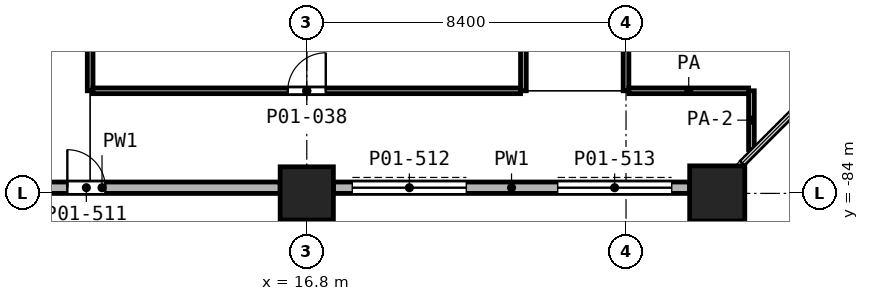
"""IFC4 building model, lengths in metres.
Left out: names, types, materials, properties, quantities, classifications, styles, units other than length and angle.
Written with IfcOpenShell. Run it as: python <this file> out.ifc"""

import sys

from ifc_helpers import new_model, si_unit, direction, frame, frame_2d, origin, origin_2d, place, context, subcontext, project, spatial, rectangle, extrude, element, fill, save


model = new_model("IFC4")
c1 = context("Model", 3, precision=1e-05, world=origin(), true_north=direction((0.0, 1.0)))
c2 = subcontext(c1, "Body", "Model", "MODEL_VIEW")
j1 = project(units=[si_unit("LENGTHUNIT", "METRE"), si_unit("PLANEANGLEUNIT", "RADIAN")], contexts=[c1])
p1 = place(None, origin())
s1 = spatial("IfcSite", under=j1, at=p1, CompositionType="ELEMENT")
p2 = place(p1, origin())
s2 = spatial("IfcBuilding", under=s1, at=p2, CompositionType="ELEMENT")
p3 = place(p2, origin())
s3 = spatial("IfcBuildingStorey", under=s2, at=p3, CompositionType="ELEMENT", Elevation=0.0)
p4 = place(p3, frame((16.8, -84.0, 0.0), z_axis=(0.0, 0.0, 1.0), x_axis=(1.0, 0.0, 0.0)))
e1 = element("IfcColumn", 1, at=p4, inside=s3, PredefinedType="COLUMN", context=c2, shape_type="SweptSolid", body=[
    extrude(rectangle(XDim=1.4, YDim=1.4, at=origin_2d()), origin(), (0.0, 0.0, 1.0), 7.0),
])
p5 = place(p3, frame((27.6, -84.0, 0.0), z_axis=(0.0, 0.0, 1.0), x_axis=(1.0, 0.0, 0.0)))
e2 = element("IfcColumn", 2, at=p5, inside=s3, PredefinedType="COLUMN", context=c2, shape_type="SweptSolid", body=[
    extrude(rectangle(XDim=1.45, YDim=1.45, at=origin_2d()), origin(), (0.0, 0.0, 1.0), 7.0),
])
p6 = place(p3, frame((6.725, -83.85, 0.0), z_axis=(0.0, 0.0, 1.0), x_axis=(1.0, 0.0, 0.0)))
e3 = element("IfcWall", 3, at=p6, inside=s3, PredefinedType="SOLIDWALL", context=c2, shape_type="SweptSolid", body=[
    extrude(rectangle(XDim=9.375, YDim=0.3, at=frame_2d((4.688, 0.0))), origin(), (0.0, 0.0, 1.0), 5.25),
])
p7 = place(p6, frame((3.775, 0.0, 0.0)))
e4 = element("IfcOpeningElement", 4, at=p7, cuts=e3, PredefinedType="OPENING", context=c2, shape_type="SweptSolid", body=[
    extrude(rectangle(XDim=1.0, YDim=2.1, at=frame_2d((0.5, 1.05))), frame((0.0, 0.16, 0.0), z_axis=(0.0, -1.0, 0.0), x_axis=(1.0, 0.0, 0.0)), (0.0, 0.0, 1.0), 0.32),
])
p8 = place(p3, frame((17.5, -83.85, 0.0), z_axis=(0.0, 0.0, 1.0), x_axis=(1.0, 0.0, 0.0)))
e5 = element("IfcWall", 5, at=p8, inside=s3, PredefinedType="SOLIDWALL", context=c2, shape_type="SweptSolid", body=[
    extrude(rectangle(XDim=9.375, YDim=0.3, at=frame_2d((4.688, 0.0))), origin(), (0.0, 0.0, 1.0), 5.25),
])
p9 = place(p8, frame((0.5, 0.0, 0.0)))
e6 = element("IfcOpeningElement", 6, at=p9, cuts=e5, PredefinedType="OPENING", context=c2, shape_type="SweptSolid", body=[
    extrude(rectangle(XDim=3.0, YDim=3.5, at=frame_2d((1.5, 1.75))), frame((0.0, 0.16, 0.0), z_axis=(0.0, -1.0, 0.0), x_axis=(1.0, 0.0, 0.0)), (0.0, 0.0, 1.0), 0.32),
])
p10 = place(p8, frame((5.9, 0.0, 0.0)))
e7 = element("IfcOpeningElement", 7, at=p10, cuts=e5, PredefinedType="OPENING", context=c2, shape_type="SweptSolid", body=[
    extrude(rectangle(XDim=3.0, YDim=3.5, at=frame_2d((1.5, 1.75))), frame((0.0, 0.16, 0.0), z_axis=(0.0, -1.0, 0.0), x_axis=(1.0, 0.0, 0.0)), (0.0, 0.0, 1.0), 0.32),
])
p11 = place(p3, frame((11.175, -81.3, 0.0), z_axis=(0.0, 0.0, 1.0), x_axis=(1.0, 0.0, 0.0)))
e8 = element("IfcWall", 8, at=p11, inside=s3, PredefinedType="PARTITIONING", context=c2, shape_type="SweptSolid", body=[
    extrude(rectangle(XDim=11.25, YDim=0.15, at=frame_2d((5.625, 0.0))), origin(), (0.0, 0.0, 1.0), 6.65),
])
p12 = place(p11, frame((5.125, 0.0, 0.0)))
e9 = element("IfcOpeningElement", 9, at=p12, cuts=e8, PredefinedType="OPENING", context=c2, shape_type="SweptSolid", body=[
    extrude(rectangle(XDim=1.0, YDim=2.1, at=frame_2d((0.5, 1.05))), frame((0.0, 0.085, 0.0), z_axis=(0.0, -1.0, 0.0), x_axis=(1.0, 0.0, 0.0)), (0.0, 0.0, 1.0), 0.17),
])
p13 = place(p3, frame((25.275, -81.3, 0.0), z_axis=(0.0, 0.0, 1.0), x_axis=(1.0, 0.0, 0.0)))
e10 = element("IfcWall", 10, at=p13, inside=s3, PredefinedType="PARTITIONING", context=c2, shape_type="SweptSolid", body=[
    extrude(rectangle(XDim=3.15, YDim=0.15, at=frame_2d((1.575, 0.0))), origin(), (0.0, 0.0, 1.0), 6.65),
])
p14 = place(p3, frame((11.1, -81.3, 0.0), z_axis=(0.0, 0.0, 1.0), x_axis=(0.0, 1.0, 0.0)))
e11 = element("IfcWall", 11, at=p14, inside=s3, PredefinedType="PARTITIONING", context=c2, shape_type="SweptSolid", body=[
    extrude(rectangle(XDim=51.9, YDim=0.15, at=frame_2d((25.95, 0.0))), origin(), (0.0, 0.0, 1.0), 6.65),
])
p15 = place(p14, frame((49.0, 0.0, 0.0)))
e12 = element("IfcOpeningElement", 12, at=p15, cuts=e11, PredefinedType="OPENING", context=c2, shape_type="SweptSolid", body=[
    extrude(rectangle(XDim=1.0, YDim=2.1, at=frame_2d((0.5, 1.05))), frame((0.0, 0.085, 0.0), z_axis=(0.0, -1.0, 0.0), x_axis=(1.0, 0.0, 0.0)), (0.0, 0.0, 1.0), 0.17),
])
p16 = place(p14, frame((41.05, 0.0, 0.0)))
e13 = element("IfcOpeningElement", 13, at=p16, cuts=e11, PredefinedType="OPENING", context=c2, shape_type="SweptSolid", body=[
    extrude(rectangle(XDim=1.0, YDim=2.1, at=frame_2d((0.5, 1.05))), frame((0.0, 0.085, 0.0), z_axis=(0.0, -1.0, 0.0), x_axis=(1.0, 0.0, 0.0)), (0.0, 0.0, 1.0), 0.17),
])
p17 = place(p14, frame((36.55, 0.0, 0.0)))
e14 = element("IfcOpeningElement", 14, at=p17, cuts=e11, PredefinedType="OPENING", context=c2, shape_type="SweptSolid", body=[
    extrude(rectangle(XDim=1.0, YDim=2.1, at=frame_2d((0.5, 1.05))), frame((0.0, 0.085, 0.0), z_axis=(0.0, -1.0, 0.0), x_axis=(1.0, 0.0, 0.0)), (0.0, 0.0, 1.0), 0.17),
])
p18 = place(p14, frame((28.6, 0.0, 0.0)))
e15 = element("IfcOpeningElement", 15, at=p18, cuts=e11, PredefinedType="OPENING", context=c2, shape_type="SweptSolid", body=[
    extrude(rectangle(XDim=1.0, YDim=2.1, at=frame_2d((0.5, 1.05))), frame((0.0, 0.085, 0.0), z_axis=(0.0, -1.0, 0.0), x_axis=(1.0, 0.0, 0.0)), (0.0, 0.0, 1.0), 0.17),
])
p19 = place(p14, frame((24.4, 0.0, 0.0)))
e16 = element("IfcOpeningElement", 16, at=p19, cuts=e11, PredefinedType="OPENING", context=c2, shape_type="SweptSolid", body=[
    extrude(rectangle(XDim=1.0, YDim=2.1, at=frame_2d((0.5, 1.05))), frame((0.0, 0.085, 0.0), z_axis=(0.0, -1.0, 0.0), x_axis=(1.0, 0.0, 0.0)), (0.0, 0.0, 1.0), 0.17),
])
p20 = place(p14, frame((15.7, 0.0, 0.0)))
e17 = element("IfcOpeningElement", 17, at=p20, cuts=e11, PredefinedType="OPENING", context=c2, shape_type="SweptSolid", body=[
    extrude(rectangle(XDim=1.0, YDim=2.1, at=frame_2d((0.5, 1.05))), frame((0.0, 0.085, 0.0), z_axis=(0.0, -1.0, 0.0), x_axis=(1.0, 0.0, 0.0)), (0.0, 0.0, 1.0), 0.17),
])
p21 = place(p14, frame((11.2, 0.0, 0.0)))
e18 = element("IfcOpeningElement", 18, at=p21, cuts=e11, PredefinedType="OPENING", context=c2, shape_type="SweptSolid", body=[
    extrude(rectangle(XDim=1.0, YDim=2.1, at=frame_2d((0.5, 1.05))), frame((0.0, 0.085, 0.0), z_axis=(0.0, -1.0, 0.0), x_axis=(1.0, 0.0, 0.0)), (0.0, 0.0, 1.0), 0.17),
])
p22 = place(p3, frame((22.5, -81.3, 0.0), z_axis=(0.0, 0.0, 1.0), x_axis=(0.0, 1.0, 0.0)))
e19 = element("IfcWall", 19, at=p22, inside=s3, PredefinedType="PARTITIONING", context=c2, shape_type="SweptSolid", body=[
    extrude(rectangle(XDim=56.1, YDim=0.15, at=frame_2d((28.05, 0.0))), origin(), (0.0, 0.0, 1.0), 6.65),
])
p23 = place(p22, frame((53.2, 0.0, 0.0)))
e20 = element("IfcOpeningElement", 20, at=p23, cuts=e19, PredefinedType="OPENING", context=c2, shape_type="SweptSolid", body=[
    extrude(rectangle(XDim=1.0, YDim=2.1, at=frame_2d((0.5, 1.05))), frame((0.0, 0.085, 0.0), z_axis=(0.0, -1.0, 0.0), x_axis=(1.0, 0.0, 0.0)), (0.0, 0.0, 1.0), 0.17),
])
p24 = place(p22, frame((45.25, 0.0, 0.0)))
e21 = element("IfcOpeningElement", 21, at=p24, cuts=e19, PredefinedType="OPENING", context=c2, shape_type="SweptSolid", body=[
    extrude(rectangle(XDim=1.0, YDim=2.1, at=frame_2d((0.5, 1.05))), frame((0.0, 0.085, 0.0), z_axis=(0.0, -1.0, 0.0), x_axis=(1.0, 0.0, 0.0)), (0.0, 0.0, 1.0), 0.17),
])
p25 = place(p22, frame((32.35, 0.0, 0.0)))
e22 = element("IfcOpeningElement", 22, at=p25, cuts=e19, PredefinedType="OPENING", context=c2, shape_type="SweptSolid", body=[
    extrude(rectangle(XDim=1.0, YDim=2.1, at=frame_2d((0.5, 1.05))), frame((0.0, 0.085, 0.0), z_axis=(0.0, -1.0, 0.0), x_axis=(1.0, 0.0, 0.0)), (0.0, 0.0, 1.0), 0.17),
])
p26 = place(p22, frame((19.9, 0.0, 0.0)))
e23 = element("IfcOpeningElement", 23, at=p26, cuts=e19, PredefinedType="OPENING", context=c2, shape_type="SweptSolid", body=[
    extrude(rectangle(XDim=1.0, YDim=2.1, at=frame_2d((0.5, 1.05))), frame((0.0, 0.085, 0.0), z_axis=(0.0, -1.0, 0.0), x_axis=(1.0, 0.0, 0.0)), (0.0, 0.0, 1.0), 0.17),
])
p27 = place(p22, frame((7.0, 0.0, 0.0)))
e24 = element("IfcOpeningElement", 24, at=p27, cuts=e19, PredefinedType="OPENING", context=c2, shape_type="SweptSolid", body=[
    extrude(rectangle(XDim=1.0, YDim=2.1, at=frame_2d((0.5, 1.05))), frame((0.0, 0.085, 0.0), z_axis=(0.0, -1.0, 0.0), x_axis=(1.0, 0.0, 0.0)), (0.0, 0.0, 1.0), 0.17),
])
p28 = place(p3, frame((25.2, -81.3, 0.0), z_axis=(0.0, 0.0, 1.0), x_axis=(0.0, 1.0, 0.0)))
e25 = element("IfcWall", 25, at=p28, inside=s3, PredefinedType="PARTITIONING", context=c2, shape_type="SweptSolid", body=[
    extrude(rectangle(XDim=30.899, YDim=0.15, at=frame_2d((15.45, 0.0))), origin(), (0.0, 0.0, 1.0), 6.65),
])
p29 = place(p28, frame((25.95, 0.0, 0.0)))
e26 = element("IfcOpeningElement", 26, at=p29, cuts=e25, PredefinedType="OPENING", context=c2, shape_type="SweptSolid", body=[
    extrude(rectangle(XDim=1.5, YDim=2.1, at=frame_2d((0.75, 1.05))), frame((0.0, 0.085, 0.0), z_axis=(0.0, -1.0, 0.0), x_axis=(1.0, 0.0, 0.0)), (0.0, 0.0, 1.0), 0.17),
])
p30 = place(p28, frame((17.55, 0.0, 0.0)))
e27 = element("IfcOpeningElement", 27, at=p30, cuts=e25, PredefinedType="OPENING", context=c2, shape_type="SweptSolid", body=[
    extrude(rectangle(XDim=1.5, YDim=2.1, at=frame_2d((0.75, 1.05))), frame((0.0, 0.085, 0.0), z_axis=(0.0, -1.0, 0.0), x_axis=(1.0, 0.0, 0.0)), (0.0, 0.0, 1.0), 0.17),
])
p31 = place(p28, frame((9.4, 0.0, 0.0)))
e28 = element("IfcOpeningElement", 28, at=p31, cuts=e25, PredefinedType="OPENING", context=c2, shape_type="SweptSolid", body=[
    extrude(rectangle(XDim=1.0, YDim=2.1, at=frame_2d((0.5, 1.05))), frame((0.0, 0.085, 0.0), z_axis=(0.0, -1.0, 0.0), x_axis=(1.0, 0.0, 0.0)), (0.0, 0.0, 1.0), 0.17),
])
p32 = place(p28, frame((2.35, 0.0, 0.0)))
e29 = element("IfcOpeningElement", 29, at=p32, cuts=e25, PredefinedType="OPENING", context=c2, shape_type="SweptSolid", body=[
    extrude(rectangle(XDim=1.0, YDim=2.1, at=frame_2d((0.5, 1.05))), frame((0.0, 0.085, 0.0), z_axis=(0.0, -1.0, 0.0), x_axis=(1.0, 0.0, 0.0)), (0.0, 0.0, 1.0), 0.17),
])
p33 = place(p3, frame((28.5, -82.845, 0.0), z_axis=(0.0, 0.0, 1.0), x_axis=(0.0, 1.0, 0.0)))
e30 = element("IfcWall", 30, at=p33, inside=s3, PredefinedType="PARTITIONING", context=c2, shape_type="SweptSolid", body=[
    extrude(rectangle(XDim=1.545, YDim=0.15, at=frame_2d((0.772, 0.0))), origin(), (0.0, 0.0, 1.0), 5.25),
])
p34 = place(p7, origin())
e31 = element("IfcDoor", 31, at=p34, inside=s3, OperationType="SINGLE_SWING_LEFT", PredefinedType="DOOR", context=c2, shape_type="SweptSolid", body=[
    extrude(rectangle(XDim=1.0, YDim=2.1, at=frame_2d((0.5, 1.05))), frame((0.0, 0.025, 0.0), z_axis=(0.0, -1.0, 0.0), x_axis=(1.0, 0.0, 0.0)), (0.0, 0.0, 1.0), 0.05),
])
fill(e4, e31)
p35 = place(p9, origin())
e32 = element("IfcDoor", 32, at=p35, inside=s3, OperationType="ROLLINGUP", PredefinedType="DOOR", context=c2, shape_type="SweptSolid", body=[
    extrude(rectangle(XDim=3.0, YDim=3.5, at=frame_2d((1.5, 1.75))), frame((0.0, 0.025, 0.0), z_axis=(0.0, -1.0, 0.0), x_axis=(1.0, 0.0, 0.0)), (0.0, 0.0, 1.0), 0.05),
])
fill(e6, e32)
p36 = place(p10, origin())
e33 = element("IfcDoor", 33, at=p36, inside=s3, OperationType="ROLLINGUP", PredefinedType="DOOR", context=c2, shape_type="SweptSolid", body=[
    extrude(rectangle(XDim=3.0, YDim=3.5, at=frame_2d((1.5, 1.75))), frame((0.0, 0.025, 0.0), z_axis=(0.0, -1.0, 0.0), x_axis=(1.0, 0.0, 0.0)), (0.0, 0.0, 1.0), 0.05),
])
fill(e7, e33)
p37 = place(p12, origin())
e34 = element("IfcDoor", 34, at=p37, inside=s3, OperationType="SINGLE_SWING_RIGHT", PredefinedType="DOOR", context=c2, shape_type="SweptSolid", body=[
    extrude(rectangle(XDim=1.0, YDim=2.1, at=frame_2d((0.5, 1.05))), frame((0.0, 0.025, 0.0), z_axis=(0.0, -1.0, 0.0), x_axis=(1.0, 0.0, 0.0)), (0.0, 0.0, 1.0), 0.05),
])
fill(e9, e34)
save(model, sys.argv[1])
